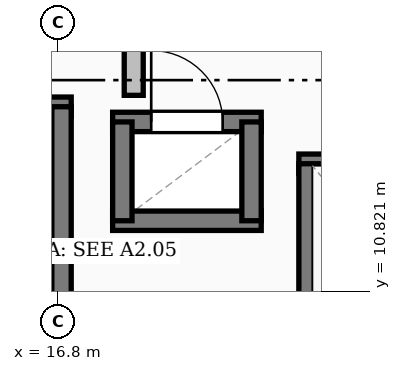
"""IFC4 building model, lengths in metres.
Left out: names, types, materials, properties, quantities, classifications, styles, units other than length and angle.
Written with IfcOpenShell. Run it as: python <this file> out.ifc"""

import sys

from ifc_helpers import new_model, si_unit, direction, frame, frame_2d, origin, place, context, subcontext, project, spatial, rectangle, extrude, element, fill, save


model = new_model("IFC4")
c1 = context("Model", 3, precision=1e-05, world=origin(), true_north=direction((0.0, 1.0)))
c2 = subcontext(c1, "Body", "Model", "MODEL_VIEW")
j1 = project(units=[si_unit("LENGTHUNIT", "METRE"), si_unit("PLANEANGLEUNIT", "RADIAN")], contexts=[c1])
p1 = place(None, origin())
s1 = spatial("IfcSite", under=j1, at=p1, CompositionType="ELEMENT")
p2 = place(p1, origin())
s2 = spatial("IfcBuilding", under=s1, at=p2, CompositionType="ELEMENT")
p3 = place(p2, origin())
s3 = spatial("IfcBuildingStorey", under=s2, at=p3, CompositionType="ELEMENT", Elevation=0.0)
p4 = place(p3, frame((8.752, 13.25, 0.0), z_axis=(0.0, 0.0, 1.0), x_axis=(1.0, 0.0, 0.0)))
e1 = element("IfcWall", 1, at=p4, inside=s3, PredefinedType="SOLIDWALL", context=c2, shape_type="SweptSolid", body=[
    extrude(rectangle(XDim=8.225, YDim=0.255, at=frame_2d((4.113, 0.0))), origin(), (0.0, 0.0, 1.0), 3.64),
])
p5 = place(p4, frame((0.35, 0.0, 0.0)))
e2 = element("IfcOpeningElement", 2, at=p5, cuts=e1, PredefinedType="OPENING", context=c2, shape_type="SweptSolid", body=[
    extrude(rectangle(XDim=1.25, YDim=2.2, at=frame_2d((0.625, 1.1))), frame((0.0, 0.137, 0.0), z_axis=(0.0, -1.0, 0.0), x_axis=(1.0, 0.0, 0.0)), (0.0, 0.0, 1.0), 0.275),
])
p6 = place(p3, frame((16.85, 9.38, 0.0), z_axis=(0.0, 0.0, 1.0), x_axis=(0.0, 1.0, 0.0)))
e3 = element("IfcWall", 3, at=p6, inside=s3, PredefinedType="SOLIDWALL", context=c2, shape_type="SweptSolid", body=[
    extrude(rectangle(XDim=3.87, YDim=0.255, at=frame_2d((1.935, 0.0))), origin(), (0.0, 0.0, 1.0), 3.64),
])
p7 = place(p3, frame((19.972, 12.5, 0.0), z_axis=(0.0, 0.0, 1.0), x_axis=(1.0, 0.0, 0.0)))
e4 = element("IfcWall", 4, at=p7, inside=s3, PredefinedType="SOLIDWALL", context=c2, shape_type="SweptSolid", body=[
    extrude(rectangle(XDim=2.455, YDim=0.255, at=frame_2d((1.228, 0.0))), origin(), (0.0, 0.0, 1.0), 3.64),
])
p8 = place(p7, frame((0.677, 0.0, 0.0)))
e5 = element("IfcOpeningElement", 5, at=p8, cuts=e4, PredefinedType="OPENING", context=c2, shape_type="SweptSolid", body=[
    extrude(rectangle(XDim=1.1, YDim=2.15, at=frame_2d((0.55, 1.075))), frame((0.0, 0.137, 0.0), z_axis=(0.0, -1.0, 0.0), x_axis=(1.0, 0.0, 0.0)), (0.0, 0.0, 1.0), 0.275),
])
p9 = place(p3, frame((20.1, 9.9, 0.0), z_axis=(0.0, 0.0, 1.0), x_axis=(0.0, 1.0, 0.0)))
e6 = element("IfcWall", 6, at=p9, inside=s3, PredefinedType="SOLIDWALL", context=c2, shape_type="SweptSolid", body=[
    extrude(rectangle(XDim=2.6, YDim=0.255, at=frame_2d((1.3, 0.0))), origin(), (0.0, 0.0, 1.0), 3.64),
])
p10 = place(p3, frame((17.522, 11.75, 0.0), z_axis=(0.0, 0.0, 1.0), x_axis=(1.0, 0.0, 0.0)))
e7 = element("IfcWall", 7, at=p10, inside=s3, PredefinedType="SOLIDWALL", context=c2, shape_type="SweptSolid", body=[
    extrude(rectangle(XDim=1.955, YDim=0.255, at=frame_2d((0.978, 0.0))), origin(), (0.0, 0.0, 1.0), 3.64),
])
p11 = place(p3, frame((17.522, 13.05, 0.0), z_axis=(0.0, 0.0, 1.0), x_axis=(1.0, 0.0, 0.0)))
e8 = element("IfcWall", 8, at=p11, inside=s3, PredefinedType="SOLIDWALL", context=c2, shape_type="SweptSolid", body=[
    extrude(rectangle(XDim=1.955, YDim=0.255, at=frame_2d((0.978, 0.0))), origin(), (0.0, 0.0, 1.0), 3.64),
])
p12 = place(p11, frame((0.508, 0.0, 0.0)))
e9 = element("IfcOpeningElement", 9, at=p12, cuts=e8, PredefinedType="OPENING", context=c2, shape_type="SweptSolid", body=[
    extrude(rectangle(XDim=0.94, YDim=2.1, at=frame_2d((0.47, 1.05))), frame((0.0, 0.137, 0.0), z_axis=(0.0, -1.0, 0.0), x_axis=(1.0, 0.0, 0.0)), (0.0, 0.0, 1.0), 0.275),
])
for number, where, z_axis, x_axis in (
    (10, (17.65, 11.75, 0.0), (0.0, 0.0, 1.0), (0.0, 1.0, 0.0)),
    (11, (19.35, 11.75, 0.0), (0.0, 0.0, 1.0), (0.0, 1.0, 0.0)),
):
    element("IfcWall", number, at=place(p3, frame(where, z_axis=z_axis, x_axis=x_axis)), inside=s3, PredefinedType="SOLIDWALL", context=c2, shape_type="SweptSolid", body=[
        extrude(rectangle(XDim=1.3, YDim=0.255, at=frame_2d((0.65, 0.0))), origin(), (0.0, 0.0, 1.0), 3.64),
    ])
p13 = place(p3, frame((17.8, 13.4, 0.0), z_axis=(0.0, 0.0, 1.0), x_axis=(0.0, 1.0, 0.0)))
e12 = element("IfcWall", 12, at=p13, inside=s3, PredefinedType="SOLIDWALL", context=c2, shape_type="SweptSolid", body=[
    extrude(rectangle(XDim=48.55, YDim=0.25, at=frame_2d((24.275, 0.0))), origin(), (0.0, 0.0, 1.0), 3.64),
])
p14 = place(p13, frame((8.0, 0.0, 0.0)))
e13 = element("IfcOpeningElement", 13, at=p14, cuts=e12, PredefinedType="OPENING", context=c2, shape_type="SweptSolid", body=[
    extrude(rectangle(XDim=1.85, YDim=2.35, at=frame_2d((0.925, 1.175))), frame((0.0, 0.135, 0.0), z_axis=(0.0, -1.0, 0.0), x_axis=(1.0, 0.0, 0.0)), (0.0, 0.0, 1.0), 0.27),
])
p15 = place(p13, frame((24.0, 0.0, 0.0)))
e14 = element("IfcOpeningElement", 14, at=p15, cuts=e12, PredefinedType="OPENING", context=c2, shape_type="SweptSolid", body=[
    extrude(rectangle(XDim=1.85, YDim=2.35, at=frame_2d((0.925, 1.175))), frame((0.0, 0.135, 0.0), z_axis=(0.0, -1.0, 0.0), x_axis=(1.0, 0.0, 0.0)), (0.0, 0.0, 1.0), 0.27),
])
p16 = place(p13, frame((40.0, 0.0, 0.0)))
e15 = element("IfcOpeningElement", 15, at=p16, cuts=e12, PredefinedType="OPENING", context=c2, shape_type="SweptSolid", body=[
    extrude(rectangle(XDim=1.85, YDim=2.35, at=frame_2d((0.925, 1.175))), frame((0.0, 0.135, 0.0), z_axis=(0.0, -1.0, 0.0), x_axis=(1.0, 0.0, 0.0)), (0.0, 0.0, 1.0), 0.27),
])
p17 = place(p12, origin())
e16 = element("IfcDoor", 16, at=p17, inside=s3, OperationType="SINGLE_SWING_LEFT", PredefinedType="DOOR", context=c2, shape_type="SweptSolid", body=[
    extrude(rectangle(XDim=0.94, YDim=2.1, at=frame_2d((0.47, 1.05))), frame((0.0, 0.025, 0.0), z_axis=(0.0, -1.0, 0.0), x_axis=(1.0, 0.0, 0.0)), (0.0, 0.0, 1.0), 0.05),
])
fill(e9, e16)
save(model, sys.argv[1])
